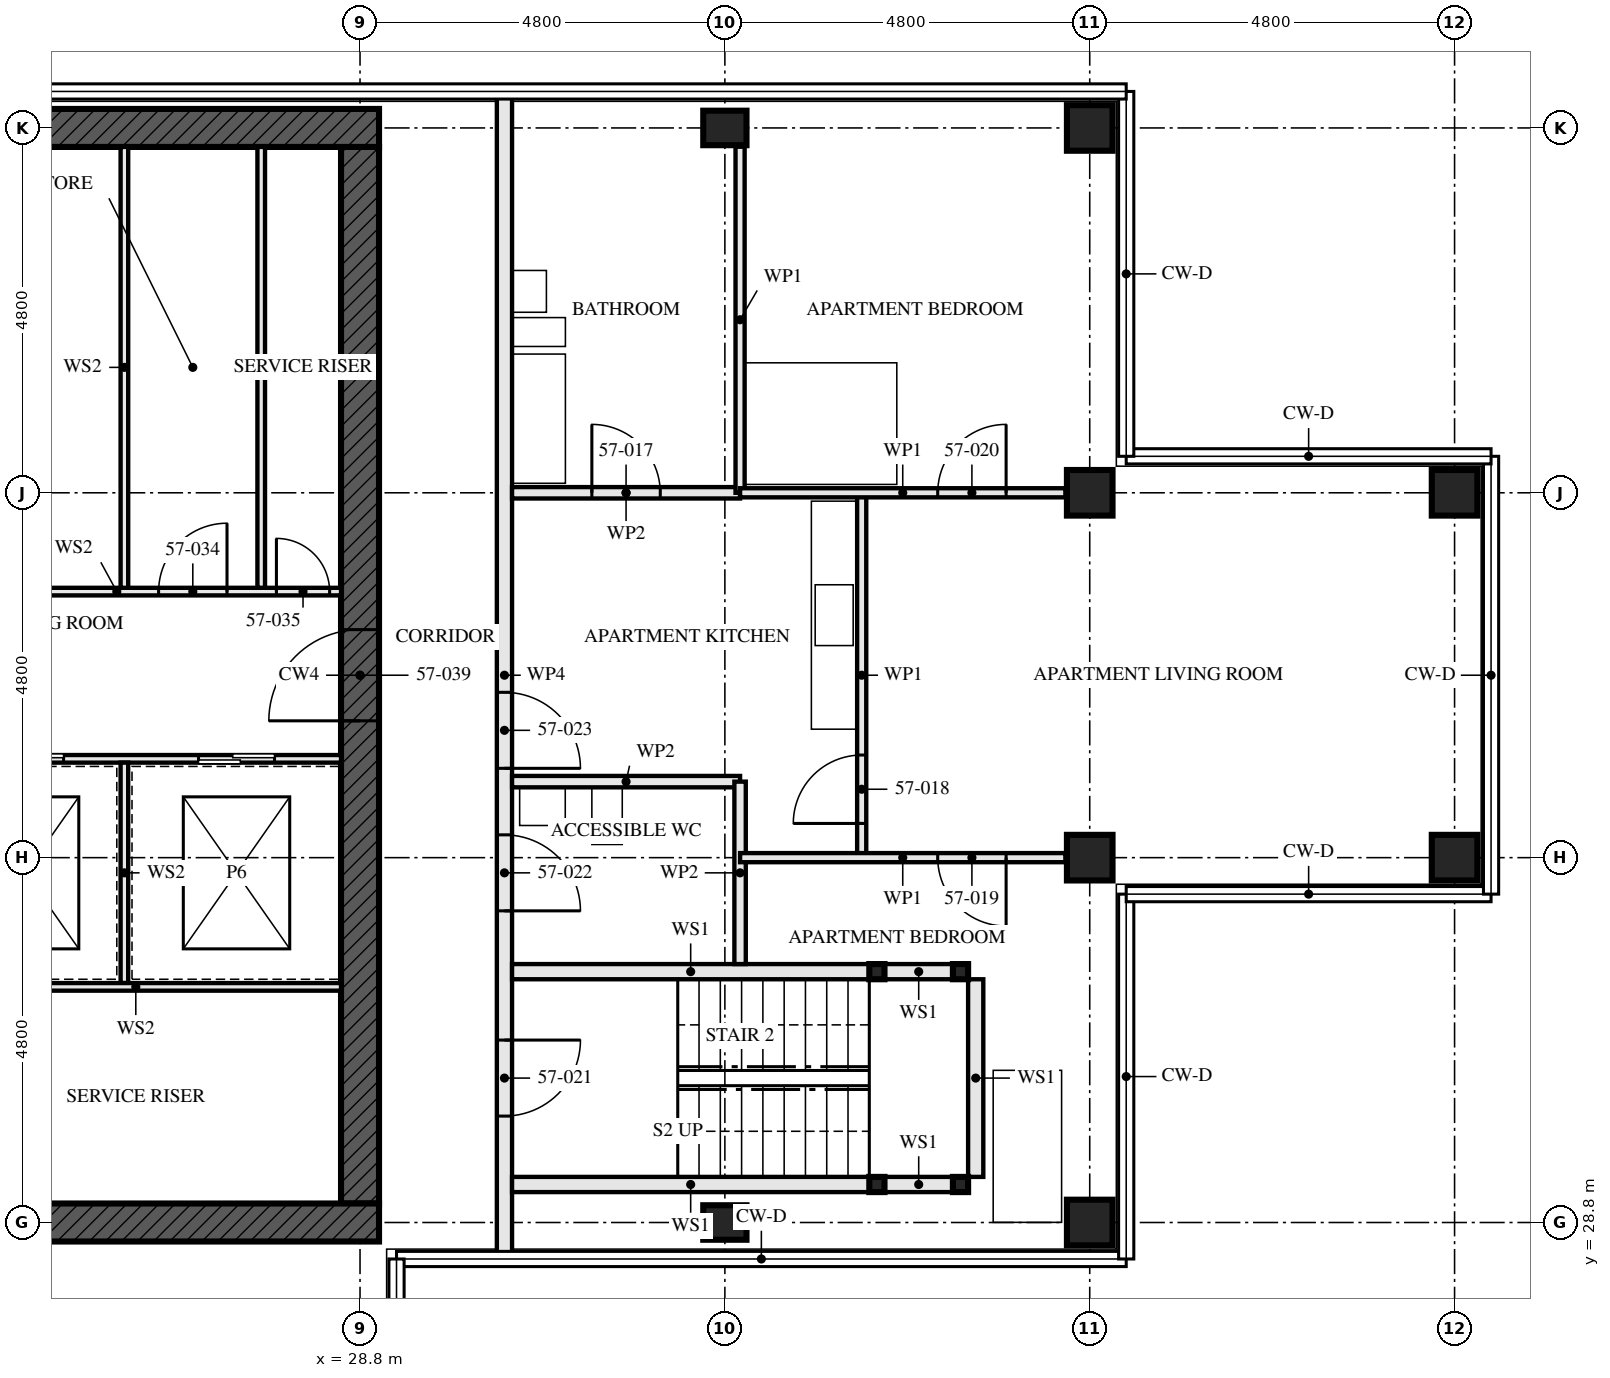
"""IFC4 building model, lengths in metres.
Left out: names, types, materials, properties, quantities, classifications, styles, units other than length and angle.
Written with IfcOpenShell. Run it as: python <this file> out.ifc"""

import sys

from ifc_helpers import new_model, si_unit, direction, frame, frame_2d, origin, origin_2d, place, context, subcontext, project, spatial, rectangle, hollow_rectangle, i_section, extrude, element, fill, save


model = new_model("IFC4")
c1 = context("Model", 3, precision=1e-05, world=origin(), true_north=direction((0.0, 1.0)))
c2 = subcontext(c1, "Body", "Model", "MODEL_VIEW")
j1 = project(units=[si_unit("LENGTHUNIT", "METRE"), si_unit("PLANEANGLEUNIT", "RADIAN")], contexts=[c1])
p1 = place(None, origin())
s1 = spatial("IfcSite", under=j1, at=p1, CompositionType="ELEMENT")
p2 = place(p1, origin())
s2 = spatial("IfcBuilding", under=s1, at=p2, CompositionType="ELEMENT")
p3 = place(p2, frame((0.0, 0.0, 208.5)))
s3 = spatial("IfcBuildingStorey", under=s2, at=p3, CompositionType="ELEMENT", Elevation=208.5)
for number, where, z_axis, x_axis in (
    (1, (33.6, 28.8, 0.0), (0.0, 0.0, 1.0), (0.0, 1.0, 0.0)),
    (2, (33.6, 43.2, 0.0), (0.0, 0.0, 1.0), (0.0, 1.0, 0.0)),
):
    element("IfcColumn", number, at=place(p3, frame(where, z_axis=z_axis, x_axis=x_axis)), inside=s3, PredefinedType="COLUMN", context=c2, shape_type="SweptSolid", body=[
        extrude(i_section(OverallWidth=0.454, OverallDepth=0.569, WebThickness=0.078, FlangeThickness=0.125, FilletRadius=0.015, at=origin_2d()), origin(), (0.0, 0.0, 1.0), 3.5),
    ])
for number, where, z_axis, x_axis in (
    (3, (38.4, 28.8, 0.0), (0.0, 0.0, 1.0), (0.0, 1.0, 0.0)),
    (4, (38.4, 33.6, 0.0), (0.0, 0.0, 1.0), (0.0, 1.0, 0.0)),
    (5, (38.4, 38.4, 0.0), (0.0, 0.0, 1.0), (0.0, 1.0, 0.0)),
    (6, (38.4, 43.2, 0.0), (0.0, 0.0, 1.0), (0.0, 1.0, 0.0)),
    (7, (43.2, 33.6, 0.0), (0.0, 0.0, 1.0), (0.0, 1.0, 0.0)),
    (8, (43.2, 38.4, 0.0), (0.0, 0.0, 1.0), (0.0, 1.0, 0.0)),
):
    element("IfcColumn", number, at=place(p3, frame(where, z_axis=z_axis, x_axis=x_axis)), inside=s3, PredefinedType="COLUMN", context=c2, shape_type="SweptSolid", body=[
        extrude(hollow_rectangle(XDim=0.6, YDim=0.6, WallThickness=0.05, at=origin_2d()), origin(), (0.0, 0.0, 1.0), 3.5),
    ])
p4 = place(p3, frame((14.15, 28.8, -0.17), z_axis=(0.0, 0.0, 1.0), x_axis=(1.0, 0.0, 0.0)))
e9 = element("IfcWall", 9, at=p4, inside=s3, PredefinedType="SHEAR", context=c2, shape_type="SweptSolid", body=[
    extrude(rectangle(XDim=14.9, YDim=0.5, at=frame_2d((7.45, 0.0))), origin(), (0.0, 0.0, 1.0), 3.5),
])
p5 = place(p4, frame((6.85, 0.0, 0.17)))
e10 = element("IfcOpeningElement", 10, at=p5, cuts=e9, PredefinedType="OPENING", context=c2, shape_type="SweptSolid", body=[
    extrude(rectangle(XDim=1.2, YDim=2.1, at=frame_2d((0.6, 1.05))), frame((0.0, 0.26, 0.0), z_axis=(0.0, -1.0, 0.0), x_axis=(1.0, 0.0, 0.0)), (0.0, 0.0, 1.0), 0.521),
])
p6 = place(p3, frame((29.05, 43.2, -0.17), z_axis=(0.0, 0.0, 1.0), x_axis=(-1.0, 0.0, 0.0)))
e11 = element("IfcWall", 11, at=p6, inside=s3, PredefinedType="SHEAR", context=c2, shape_type="SweptSolid", body=[
    extrude(rectangle(XDim=14.9, YDim=0.5, at=frame_2d((7.45, 0.0))), origin(), (0.0, 0.0, 1.0), 3.5),
])
p7 = place(p3, frame((28.8, 29.05, -0.17), z_axis=(0.0, 0.0, 1.0), x_axis=(0.0, 1.0, 0.0)))
e12 = element("IfcWall", 12, at=p7, inside=s3, PredefinedType="SHEAR", context=c2, shape_type="SweptSolid", body=[
    extrude(rectangle(XDim=13.9, YDim=0.5, at=frame_2d((6.95, 0.0))), origin(), (0.0, 0.0, 1.0), 3.5),
])
p8 = place(p7, frame((6.35, 0.0, 0.17)))
e13 = element("IfcOpeningElement", 13, at=p8, cuts=e12, PredefinedType="OPENING", context=c2, shape_type="SweptSolid", body=[
    extrude(rectangle(XDim=1.2, YDim=2.1, at=frame_2d((0.6, 1.05))), frame((0.0, 0.26, 0.0), z_axis=(0.0, -1.0, 0.0), x_axis=(1.0, 0.0, 0.0)), (0.0, 0.0, 1.0), 0.521),
])
for number, where, z_axis, x_axis in (
    (14, (36.7, 29.3, 0.0), (0.0, 0.0, 1.0), (1.0, 0.0, 0.0)),
    (15, (36.7, 32.1, 0.0), (0.0, 0.0, 1.0), (1.0, 0.0, 0.0)),
    (16, (35.6, 29.3, 0.0), (0.0, 0.0, 1.0), (1.0, 0.0, 0.0)),
    (17, (35.6, 32.1, 0.0), (0.0, 0.0, 1.0), (1.0, 0.0, 0.0)),
):
    element("IfcColumn", number, at=place(p3, frame(where, z_axis=z_axis, x_axis=x_axis)), inside=s3, PredefinedType="COLUMN", context=c2, shape_type="SweptSolid", body=[
        extrude(hollow_rectangle(XDim=0.2, YDim=0.2, WallThickness=0.008, at=origin_2d()), origin(), (0.0, 0.0, 1.0), 3.33),
    ])
p9 = place(p3, frame((36.6, 29.3, 0.0), z_axis=(0.0, 0.0, 1.0), x_axis=(-1.0, 0.0, 0.0)))
e18 = element("IfcWall", 18, at=p9, inside=s3, PredefinedType="SOLIDWALL", context=c2, shape_type="SweptSolid", body=[
    extrude(rectangle(XDim=0.9, YDim=0.2, at=frame_2d((0.45, 0.0))), origin(), (0.0, 0.0, 1.0), 2.99),
])
p10 = place(p3, frame((35.5, 29.3, 0.0), z_axis=(0.0, 0.0, 1.0), x_axis=(-1.0, 0.0, 0.0)))
e19 = element("IfcWall", 19, at=p10, inside=s3, PredefinedType="SOLIDWALL", context=c2, shape_type="SweptSolid", body=[
    extrude(rectangle(XDim=4.7, YDim=0.2, at=frame_2d((2.35, 0.0))), origin(), (0.0, 0.0, 1.0), 2.99),
])
p11 = place(p3, frame((36.6, 32.1, 0.0), z_axis=(0.0, 0.0, 1.0), x_axis=(-1.0, 0.0, 0.0)))
e20 = element("IfcWall", 20, at=p11, inside=s3, PredefinedType="SOLIDWALL", context=c2, shape_type="SweptSolid", body=[
    extrude(rectangle(XDim=0.9, YDim=0.2, at=frame_2d((0.45, 0.0))), origin(), (0.0, 0.0, 1.0), 2.99),
])
p12 = place(p3, frame((35.5, 32.1, 0.0), z_axis=(0.0, 0.0, 1.0), x_axis=(-1.0, 0.0, 0.0)))
e21 = element("IfcWall", 21, at=p12, inside=s3, PredefinedType="SOLIDWALL", context=c2, shape_type="SweptSolid", body=[
    extrude(rectangle(XDim=4.7, YDim=0.2, at=frame_2d((2.35, 0.0))), origin(), (0.0, 0.0, 1.0), 2.99),
])
p13 = place(p3, frame((36.9, 29.4, 0.0), z_axis=(0.0, 0.0, 1.0), x_axis=(0.0, 1.0, 0.0)))
e22 = element("IfcWall", 22, at=p13, inside=s3, PredefinedType="SOLIDWALL", context=c2, shape_type="SweptSolid", body=[
    extrude(rectangle(XDim=2.6, YDim=0.2, at=frame_2d((1.3, 0.0))), origin(), (0.0, 0.0, 1.0), 3.33),
])
p14 = place(p3, frame((33.8, 32.2, 0.0), z_axis=(0.0, 0.0, 1.0), x_axis=(0.0, 1.0, 0.0)))
e23 = element("IfcWall", 23, at=p14, inside=s3, PredefinedType="PARTITIONING", context=c2, shape_type="SweptSolid", body=[
    extrude(rectangle(XDim=2.4, YDim=0.15, at=frame_2d((1.2, 0.0))), origin(), (0.0, 0.0, 1.0), 2.55),
])
p15 = place(p3, frame((33.8, 34.6, 0.0), z_axis=(0.0, 0.0, 1.0), x_axis=(-1.0, 0.0, 0.0)))
e24 = element("IfcWall", 24, at=p15, inside=s3, PredefinedType="PARTITIONING", context=c2, shape_type="SweptSolid", body=[
    extrude(rectangle(XDim=3.0, YDim=0.15, at=frame_2d((1.5, 0.0))), origin(), (0.0, 0.0, 1.0), 3.33),
])
p16 = place(p3, frame((33.8, 38.4, 0.0), z_axis=(0.0, 0.0, 1.0), x_axis=(-1.0, 0.0, 0.0)))
e25 = element("IfcWall", 25, at=p16, inside=s3, PredefinedType="PARTITIONING", context=c2, shape_type="SweptSolid", body=[
    extrude(rectangle(XDim=3.0, YDim=0.15, at=frame_2d((1.5, 0.0))), origin(), (0.0, 0.0, 1.0), 2.55),
])
p17 = place(p16, frame((1.05, 0.0, 0.0)))
e26 = element("IfcOpeningElement", 26, at=p17, cuts=e25, PredefinedType="OPENING", context=c2, shape_type="SweptSolid", body=[
    extrude(rectangle(XDim=0.9, YDim=2.1, at=frame_2d((0.45, 1.05))), frame((0.0, 0.085, 0.0), z_axis=(0.0, -1.0, 0.0), x_axis=(1.0, 0.0, 0.0)), (0.0, 0.0, 1.0), 0.171),
])
p18 = place(p3, frame((35.4, 33.6, 0.0), z_axis=(0.0, 0.0, 1.0), x_axis=(0.0, 1.0, 0.0)))
e27 = element("IfcWall", 27, at=p18, inside=s3, PredefinedType="PARTITIONING", context=c2, shape_type="SweptSolid", body=[
    extrude(rectangle(XDim=4.8, YDim=0.12, at=frame_2d((2.4, 0.0))), origin(), (0.0, 0.0, 1.0), 3.33),
])
p19 = place(p18, frame((0.45, 0.0, 0.0)))
e28 = element("IfcOpeningElement", 28, at=p19, cuts=e27, PredefinedType="OPENING", context=c2, shape_type="SweptSolid", body=[
    extrude(rectangle(XDim=0.9, YDim=2.1, at=frame_2d((0.45, 1.05))), frame((0.0, 0.071, 0.0), z_axis=(0.0, -1.0, 0.0), x_axis=(1.0, 0.0, 0.0)), (0.0, 0.0, 1.0), 0.141),
])
p20 = place(p3, frame((33.8, 38.4, 0.0), z_axis=(0.0, 0.0, 1.0), x_axis=(0.0, 1.0, 0.0)))
e29 = element("IfcWall", 29, at=p20, inside=s3, PredefinedType="PARTITIONING", context=c2, shape_type="SweptSolid", body=[
    extrude(rectangle(XDim=4.553, YDim=0.12, at=frame_2d((2.276, 0.0))), origin(), (0.0, 0.0, 1.0), 3.33),
])
p21 = place(p3, frame((38.08, 33.6, 0.0), z_axis=(0.0, 0.0, 1.0), x_axis=(-1.0, 0.0, 0.0)))
e30 = element("IfcWall", 30, at=p21, inside=s3, PredefinedType="PARTITIONING", context=c2, shape_type="SweptSolid", body=[
    extrude(rectangle(XDim=4.28, YDim=0.12, at=frame_2d((2.14, 0.0))), origin(), (0.0, 0.0, 1.0), 2.55),
])
p22 = place(p21, frame((0.78, 0.0, 0.0)))
e31 = element("IfcOpeningElement", 31, at=p22, cuts=e30, PredefinedType="OPENING", context=c2, shape_type="SweptSolid", body=[
    extrude(rectangle(XDim=0.9, YDim=2.1, at=frame_2d((0.45, 1.05))), frame((0.0, 0.071, 0.0), z_axis=(0.0, -1.0, 0.0), x_axis=(1.0, 0.0, 0.0)), (0.0, 0.0, 1.0), 0.141),
])
p23 = place(p3, frame((38.08, 38.4, 0.0), z_axis=(0.0, 0.0, 1.0), x_axis=(-1.0, 0.0, 0.0)))
e32 = element("IfcWall", 32, at=p23, inside=s3, PredefinedType="PARTITIONING", context=c2, shape_type="SweptSolid", body=[
    extrude(rectangle(XDim=4.28, YDim=0.12, at=frame_2d((2.14, 0.0))), origin(), (0.0, 0.0, 1.0), 2.55),
])
p24 = place(p23, frame((0.78, 0.0, 0.0)))
e33 = element("IfcOpeningElement", 33, at=p24, cuts=e32, PredefinedType="OPENING", context=c2, shape_type="SweptSolid", body=[
    extrude(rectangle(XDim=0.9, YDim=2.1, at=frame_2d((0.45, 1.05))), frame((0.0, 0.071, 0.0), z_axis=(0.0, -1.0, 0.0), x_axis=(1.0, 0.0, 0.0)), (0.0, 0.0, 1.0), 0.141),
])
p25 = place(p3, frame((30.7, 28.345, 0.0), z_axis=(0.0, 0.0, 1.0), x_axis=(0.0, 1.0, 0.0)))
e34 = element("IfcWall", 34, at=p25, inside=s3, PredefinedType="PARTITIONING", context=c2, shape_type="SweptSolid", body=[
    extrude(rectangle(XDim=15.31, YDim=0.2, at=frame_2d((7.655, 0.0))), origin(), (0.0, 0.0, 1.0), 2.32),
])
p26 = place(p25, frame((1.855, 0.0, 0.0)))
e35 = element("IfcOpeningElement", 35, at=p26, cuts=e34, PredefinedType="OPENING", context=c2, shape_type="SweptSolid", body=[
    extrude(rectangle(XDim=1.0, YDim=2.1, at=frame_2d((0.5, 1.05))), frame((0.0, 0.111, 0.0), z_axis=(0.0, -1.0, 0.0), x_axis=(1.0, 0.0, 0.0)), (0.0, 0.0, 1.0), 0.221),
])
p27 = place(p25, frame((4.555, 0.0, 0.0)))
e36 = element("IfcOpeningElement", 36, at=p27, cuts=e34, PredefinedType="OPENING", context=c2, shape_type="SweptSolid", body=[
    extrude(rectangle(XDim=1.0, YDim=2.1, at=frame_2d((0.5, 1.05))), frame((0.0, 0.111, 0.0), z_axis=(0.0, -1.0, 0.0), x_axis=(1.0, 0.0, 0.0)), (0.0, 0.0, 1.0), 0.221),
])
p28 = place(p25, frame((6.43, 0.0, 0.0)))
e37 = element("IfcOpeningElement", 37, at=p28, cuts=e34, PredefinedType="OPENING", context=c2, shape_type="SweptSolid", body=[
    extrude(rectangle(XDim=1.0, YDim=2.1, at=frame_2d((0.5, 1.05))), frame((0.0, 0.111, 0.0), z_axis=(0.0, -1.0, 0.0), x_axis=(1.0, 0.0, 0.0)), (0.0, 0.0, 1.0), 0.221),
])
p29 = place(p3, frame((27.5, 37.15, 0.0), z_axis=(0.0, 0.0, 1.0), x_axis=(0.0, 1.0, 0.0)))
e38 = element("IfcWall", 38, at=p29, inside=s3, PredefinedType="SOLIDWALL", context=c2, shape_type="SweptSolid", body=[
    extrude(rectangle(XDim=5.8, YDim=0.1, at=frame_2d((2.9, 0.0))), origin(), (0.0, 0.0, 1.0), 3.33),
])
p30 = place(p3, frame((23.05, 34.9, 0.0), z_axis=(0.0, 0.0, 1.0), x_axis=(1.0, 0.0, 0.0)))
e39 = element("IfcWall", 39, at=p30, inside=s3, PredefinedType="SOLIDWALL", context=c2, shape_type="SweptSolid", body=[
    extrude(rectangle(XDim=5.5, YDim=0.1, at=frame_2d((2.75, 0.0))), origin(), (0.0, 0.0, 1.0), 3.33),
])
p31 = place(p30, frame((0.85, 0.0, 0.0)))
e40 = element("IfcOpeningElement", 40, at=p31, cuts=e39, PredefinedType="OPENING", context=c2, shape_type="SweptSolid", body=[
    extrude(rectangle(XDim=1.0, YDim=2.1, at=frame_2d((0.5, 1.05))), frame((0.0, 0.061, 0.0), z_axis=(0.0, -1.0, 0.0), x_axis=(1.0, 0.0, 0.0)), (0.0, 0.0, 1.0), 0.121),
])
p32 = place(p30, frame((3.625, 0.0, 0.0)))
e41 = element("IfcOpeningElement", 41, at=p32, cuts=e39, PredefinedType="OPENING", context=c2, shape_type="SweptSolid", body=[
    extrude(rectangle(XDim=1.0, YDim=2.1, at=frame_2d((0.5, 1.05))), frame((0.0, 0.061, 0.0), z_axis=(0.0, -1.0, 0.0), x_axis=(1.0, 0.0, 0.0)), (0.0, 0.0, 1.0), 0.121),
])
p33 = place(p3, frame((22.65, 37.1, 0.0), z_axis=(0.0, 0.0, 1.0), x_axis=(1.0, 0.0, 0.0)))
e42 = element("IfcWall", 42, at=p33, inside=s3, PredefinedType="SOLIDWALL", context=c2, shape_type="SweptSolid", body=[
    extrude(rectangle(XDim=5.9, YDim=0.1, at=frame_2d((2.95, 0.0))), origin(), (0.0, 0.0, 1.0), 3.33),
])
p34 = place(p33, frame((3.5, 0.0, 0.0)))
e43 = element("IfcOpeningElement", 43, at=p34, cuts=e42, PredefinedType="OPENING", context=c2, shape_type="SweptSolid", body=[
    extrude(rectangle(XDim=0.9, YDim=2.1, at=frame_2d((0.45, 1.05))), frame((0.0, 0.061, 0.0), z_axis=(0.0, -1.0, 0.0), x_axis=(1.0, 0.0, 0.0)), (0.0, 0.0, 1.0), 0.121),
])
p35 = place(p33, frame((5.05, 0.0, 0.0)))
e44 = element("IfcOpeningElement", 44, at=p35, cuts=e42, PredefinedType="OPENING", context=c2, shape_type="SweptSolid", body=[
    extrude(rectangle(XDim=0.7, YDim=2.1, at=frame_2d((0.35, 1.05))), frame((0.0, 0.061, 0.0), z_axis=(0.0, -1.0, 0.0), x_axis=(1.0, 0.0, 0.0)), (0.0, 0.0, 1.0), 0.121),
])
p36 = place(p3, frame((25.7, 37.15, 0.0), z_axis=(0.0, 0.0, 1.0), x_axis=(0.0, 1.0, 0.0)))
e45 = element("IfcWall", 45, at=p36, inside=s3, PredefinedType="SOLIDWALL", context=c2, shape_type="SweptSolid", body=[
    extrude(rectangle(XDim=5.8, YDim=0.1, at=frame_2d((2.9, 0.0))), origin(), (0.0, 0.0, 1.0), 3.33),
])
p37 = place(p3, frame((25.7, 31.95, 0.0), z_axis=(0.0, 0.0, 1.0), x_axis=(0.0, 1.0, 0.0)))
e46 = element("IfcWall", 46, at=p37, inside=s3, PredefinedType="SOLIDWALL", context=c2, shape_type="SweptSolid", body=[
    extrude(rectangle(XDim=2.9, YDim=0.1, at=frame_2d((1.45, 0.0))), origin(), (0.0, 0.0, 1.0), 3.33),
])
p38 = place(p3, frame((23.15, 31.9, 0.0), z_axis=(0.0, 0.0, 1.0), x_axis=(1.0, 0.0, 0.0)))
e47 = element("IfcWall", 47, at=p38, inside=s3, PredefinedType="SOLIDWALL", context=c2, shape_type="SweptSolid", body=[
    extrude(rectangle(XDim=5.4, YDim=0.1, at=frame_2d((2.7, 0.0))), origin(), (0.0, 0.0, 1.0), 3.33),
])
p39 = place(p17, frame((0.9, 0.0, 0.0), z_axis=(0.0, 0.0, 1.0), x_axis=(-1.0, 0.0, 0.0)))
e48 = element("IfcDoor", 48, at=p39, inside=s3, OperationType="SINGLE_SWING_RIGHT", PredefinedType="DOOR", context=c2, shape_type="SweptSolid", body=[
    extrude(rectangle(XDim=0.9, YDim=2.1, at=frame_2d((0.45, 1.05))), frame((0.0, 0.022, 0.0), z_axis=(0.0, -1.0, 0.0), x_axis=(1.0, 0.0, 0.0)), (0.0, 0.0, 1.0), 0.044),
])
fill(e26, e48)
p40 = place(p19, origin())
e49 = element("IfcDoor", 49, at=p40, inside=s3, OperationType="SINGLE_SWING_RIGHT", PredefinedType="DOOR", context=c2, shape_type="SweptSolid", body=[
    extrude(rectangle(XDim=0.9, YDim=2.1, at=frame_2d((0.45, 1.05))), frame((0.0, 0.022, 0.0), z_axis=(0.0, -1.0, 0.0), x_axis=(1.0, 0.0, 0.0)), (0.0, 0.0, 1.0), 0.044),
])
fill(e28, e49)
p41 = place(p22, origin())
e50 = element("IfcDoor", 50, at=p41, inside=s3, OperationType="SINGLE_SWING_RIGHT", PredefinedType="DOOR", context=c2, shape_type="SweptSolid", body=[
    extrude(rectangle(XDim=0.9, YDim=2.1, at=frame_2d((0.45, 1.05))), frame((0.0, 0.022, 0.0), z_axis=(0.0, -1.0, 0.0), x_axis=(1.0, 0.0, 0.0)), (0.0, 0.0, 1.0), 0.044),
])
fill(e31, e50)
p42 = place(p24, frame((0.9, 0.0, 0.0), z_axis=(0.0, 0.0, 1.0), x_axis=(-1.0, 0.0, 0.0)))
e51 = element("IfcDoor", 51, at=p42, inside=s3, OperationType="SINGLE_SWING_LEFT", PredefinedType="DOOR", context=c2, shape_type="SweptSolid", body=[
    extrude(rectangle(XDim=0.9, YDim=2.1, at=frame_2d((0.45, 1.05))), frame((0.0, 0.022, 0.0), z_axis=(0.0, -1.0, 0.0), x_axis=(1.0, 0.0, 0.0)), (0.0, 0.0, 1.0), 0.044),
])
fill(e33, e51)
p43 = place(p26, frame((1.0, 0.0, 0.0), z_axis=(0.0, 0.0, 1.0), x_axis=(-1.0, 0.0, 0.0)))
e52 = element("IfcDoor", 52, at=p43, inside=s3, OperationType="SINGLE_SWING_RIGHT", PredefinedType="DOOR", context=c2, shape_type="SweptSolid", body=[
    extrude(rectangle(XDim=1.0, YDim=2.1, at=frame_2d((0.5, 1.05))), frame((0.0, 0.032, 0.0), z_axis=(0.0, -1.0, 0.0), x_axis=(1.0, 0.0, 0.0)), (0.0, 0.0, 1.0), 0.064),
])
fill(e35, e52)
p44 = place(p27, frame((1.0, 0.0, 0.0), z_axis=(0.0, 0.0, 1.0), x_axis=(-1.0, 0.0, 0.0)))
e53 = element("IfcDoor", 53, at=p44, inside=s3, OperationType="SINGLE_SWING_LEFT", PredefinedType="DOOR", context=c2, shape_type="SweptSolid", body=[
    extrude(rectangle(XDim=1.0, YDim=2.1, at=frame_2d((0.5, 1.05))), frame((0.0, 0.027, 0.0), z_axis=(0.0, -1.0, 0.0), x_axis=(1.0, 0.0, 0.0)), (0.0, 0.0, 1.0), 0.054),
])
fill(e36, e53)
p45 = place(p28, frame((1.0, 0.0, 0.0), z_axis=(0.0, 0.0, 1.0), x_axis=(-1.0, 0.0, 0.0)))
e54 = element("IfcDoor", 54, at=p45, inside=s3, OperationType="SINGLE_SWING_LEFT", PredefinedType="DOOR", context=c2, shape_type="SweptSolid", body=[
    extrude(rectangle(XDim=1.0, YDim=2.1, at=frame_2d((0.5, 1.05))), frame((0.0, 0.027, 0.0), z_axis=(0.0, -1.0, 0.0), x_axis=(1.0, 0.0, 0.0)), (0.0, 0.0, 1.0), 0.054),
])
fill(e37, e54)
p46 = place(p31, origin())
e55 = element("IfcDoor", 55, at=p46, inside=s3, OperationType="SLIDING_TO_LEFT", PredefinedType="DOOR", context=c2, shape_type="SweptSolid", body=[
    extrude(rectangle(XDim=1.0, YDim=2.1, at=frame_2d((0.5, 1.05))), frame((0.0, 0.05, 0.0), z_axis=(0.0, -1.0, 0.0), x_axis=(1.0, 0.0, 0.0)), (0.0, 0.0, 1.0), 0.1),
])
fill(e40, e55)
p47 = place(p32, origin())
e56 = element("IfcDoor", 56, at=p47, inside=s3, OperationType="SLIDING_TO_LEFT", PredefinedType="DOOR", context=c2, shape_type="SweptSolid", body=[
    extrude(rectangle(XDim=1.0, YDim=2.1, at=frame_2d((0.5, 1.05))), frame((0.0, 0.05, 0.0), z_axis=(0.0, -1.0, 0.0), x_axis=(1.0, 0.0, 0.0)), (0.0, 0.0, 1.0), 0.1),
])
fill(e41, e56)
p48 = place(p34, origin())
e57 = element("IfcDoor", 57, at=p48, inside=s3, OperationType="SINGLE_SWING_LEFT", PredefinedType="DOOR", context=c2, shape_type="SweptSolid", body=[
    extrude(rectangle(XDim=0.9, YDim=2.1, at=frame_2d((0.45, 1.05))), frame((0.0, 0.027, 0.0), z_axis=(0.0, -1.0, 0.0), x_axis=(1.0, 0.0, 0.0)), (0.0, 0.0, 1.0), 0.054),
])
fill(e43, e57)
p49 = place(p35, origin())
e58 = element("IfcDoor", 58, at=p49, inside=s3, OperationType="SINGLE_SWING_RIGHT", PredefinedType="DOOR", context=c2, shape_type="SweptSolid", body=[
    extrude(rectangle(XDim=0.7, YDim=2.1, at=frame_2d((0.35, 1.05))), frame((0.0, 0.027, 0.0), z_axis=(0.0, -1.0, 0.0), x_axis=(1.0, 0.0, 0.0)), (0.0, 0.0, 1.0), 0.054),
])
fill(e44, e58)
p50 = place(p8, origin())
e59 = element("IfcDoor", 59, at=p50, inside=s3, OperationType="SINGLE_SWING_LEFT", PredefinedType="DOOR", context=c2, shape_type="SweptSolid", body=[
    extrude(rectangle(XDim=1.2, YDim=2.1, at=frame_2d((0.6, 1.05))), frame((0.0, 0.027, 0.0), z_axis=(0.0, -1.0, 0.0), x_axis=(1.0, 0.0, 0.0)), (0.0, 0.0, 1.0), 0.054),
])
fill(e13, e59)
save(model, sys.argv[1])
